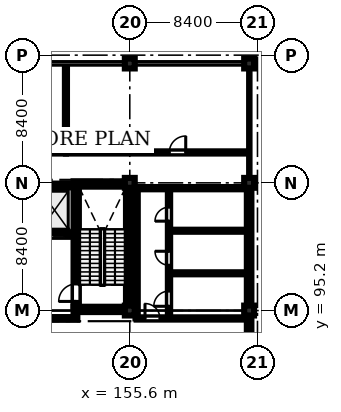
"""IFC4 building model, lengths in metres.
Left out: names, types, materials, properties, quantities, classifications, styles, units other than length and angle.
Written with IfcOpenShell. Run it as: python <this file> out.ifc"""

import sys

from ifc_helpers import new_model, si_unit, direction, frame, frame_2d, origin, origin_2d, place, context, subcontext, project, spatial, rectangle, extrude, element, fill, save


model = new_model("IFC4")
c1 = context("Model", 3, precision=1e-05, world=origin(), true_north=direction((0.0, 1.0)))
c2 = subcontext(c1, "Body", "Model", "MODEL_VIEW")
j1 = project(units=[si_unit("LENGTHUNIT", "METRE"), si_unit("PLANEANGLEUNIT", "RADIAN")], contexts=[c1])
p1 = place(None, origin())
s1 = spatial("IfcSite", under=j1, at=p1, CompositionType="ELEMENT")
p2 = place(p1, origin())
s2 = spatial("IfcBuilding", under=s1, at=p2, CompositionType="ELEMENT")
p3 = place(p2, frame((0.0, 0.0, 61.2)))
s3 = spatial("IfcBuildingStorey", under=s2, at=p3, CompositionType="ELEMENT", Elevation=61.2)
for number, where, z_axis, x_axis in (
    (1, (155.6, 95.2, 0.0), (0.0, 0.0, 1.0), (1.0, 0.0, 0.0)),
    (2, (155.6, 103.6, 0.0), (0.0, 0.0, 1.0), (1.0, 0.0, 0.0)),
    (3, (155.6, 111.45, 0.0), (0.0, 0.0, 1.0), (1.0, 0.0, 0.0)),
    (4, (163.45, 95.2, 0.0), (0.0, 0.0, 1.0), (1.0, 0.0, 0.0)),
    (5, (163.45, 103.6, 0.0), (0.0, 0.0, 1.0), (1.0, 0.0, 0.0)),
    (6, (163.45, 111.45, 0.0), (0.0, 0.0, 1.0), (1.0, 0.0, 0.0)),
):
    element("IfcColumn", number, at=place(p3, frame(where, z_axis=z_axis, x_axis=x_axis)), inside=s3, PredefinedType="COLUMN", context=c2, shape_type="SweptSolid", body=[
        extrude(rectangle(XDim=0.65, YDim=0.65, at=origin_2d()), origin(), (0.0, 0.0, 1.0), 4.28),
    ])
for number, where, z_axis, x_axis in (
    (7, (151.9, 95.275, 0.0), (0.0, 0.0, 1.0), (1.0, 0.0, 0.0)),
    (8, (151.9, 103.525, 0.0), (0.0, 0.0, 1.0), (1.0, 0.0, 0.0)),
):
    element("IfcWall", number, at=place(p3, frame(where, z_axis=z_axis, x_axis=x_axis)), inside=s3, PredefinedType="SHEAR", context=c2, shape_type="SweptSolid", body=[
        extrude(rectangle(XDim=3.8, YDim=0.35, at=frame_2d((1.9, 0.0))), origin(), (0.0, 0.0, 1.0), 4.28),
    ])
p4 = place(p3, frame((152.075, 95.45, 0.0), z_axis=(0.0, 0.0, 1.0), x_axis=(0.0, 1.0, 0.0)))
e9 = element("IfcWall", 9, at=p4, inside=s3, PredefinedType="SHEAR", context=c2, shape_type="SweptSolid", body=[
    extrude(rectangle(XDim=7.9, YDim=0.35, at=frame_2d((3.95, 0.0))), origin(), (0.0, 0.0, 1.0), 4.28),
])
p5 = place(p4, frame((0.35, 0.0, 0.0)))
e10 = element("IfcOpeningElement", 10, at=p5, cuts=e9, PredefinedType="OPENING", context=c2, shape_type="SweptSolid", body=[
    extrude(rectangle(XDim=1.15, YDim=2.15, at=frame_2d((0.575, 1.075))), frame((0.0, 0.185, 0.0), z_axis=(0.0, -1.0, 0.0), x_axis=(1.0, 0.0, 0.0)), (0.0, 0.0, 1.0), 0.37),
])
p6 = place(p3, frame((155.525, 95.45, 0.0), z_axis=(0.0, 0.0, 1.0), x_axis=(0.0, 1.0, 0.0)))
e11 = element("IfcWall", 11, at=p6, inside=s3, PredefinedType="SHEAR", context=c2, shape_type="SweptSolid", body=[
    extrude(rectangle(XDim=7.9, YDim=0.35, at=frame_2d((3.95, 0.0))), origin(), (0.0, 0.0, 1.0), 4.28),
])
p7 = place(p3, frame((149.45, 100.175, 0.0), z_axis=(0.0, 0.0, 1.0), x_axis=(1.0, 0.0, 0.0)))
e12 = element("IfcWall", 12, at=p7, inside=s3, PredefinedType="SHEAR", context=c2, shape_type="SweptSolid", body=[
    extrude(rectangle(XDim=2.45, YDim=0.25, at=frame_2d((1.225, 0.0))), origin(), (0.0, 0.0, 1.0), 4.28),
])
p8 = place(p7, frame((0.575, 0.0, 0.0)))
e13 = element("IfcOpeningElement", 13, at=p8, cuts=e12, PredefinedType="OPENING", context=c2, shape_type="SweptSolid", body=[
    extrude(rectangle(XDim=1.3, YDim=2.25, at=frame_2d((0.65, 1.125))), frame((0.0, 0.135, 0.0), z_axis=(0.0, -1.0, 0.0), x_axis=(1.0, 0.0, 0.0)), (0.0, 0.0, 1.0), 0.27),
])
p9 = place(p3, frame((149.45, 103.425, 0.0), z_axis=(0.0, 0.0, 1.0), x_axis=(1.0, 0.0, 0.0)))
e14 = element("IfcWall", 14, at=p9, inside=s3, PredefinedType="SHEAR", context=c2, shape_type="SweptSolid", body=[
    extrude(rectangle(XDim=2.45, YDim=0.25, at=frame_2d((1.225, 0.0))), origin(), (0.0, 0.0, 1.0), 4.28),
])
p10 = place(p3, frame((163.45, 94.875, 0.0), z_axis=(0.0, 0.0, 1.0), x_axis=(0.0, -1.0, 0.0)))
e15 = element("IfcWall", 15, at=p10, inside=s3, PredefinedType="STANDARD", context=c2, shape_type="SweptSolid", body=[
    extrude(rectangle(XDim=7.75, YDim=0.3, at=frame_2d((3.875, 0.0))), origin(), (0.0, 0.0, 1.0), 3.58),
])
p11 = place(p10, frame((4.2, 0.0, 1.1)))
e16 = element("IfcOpeningElement", 16, at=p11, cuts=e15, PredefinedType="OPENING", context=c2, shape_type="SweptSolid", body=[
    extrude(rectangle(XDim=1.8, YDim=1.8, at=frame_2d((0.9, 0.9))), frame((0.0, 0.16, 0.0), z_axis=(0.0, -1.0, 0.0), x_axis=(1.0, 0.0, 0.0)), (0.0, 0.0, 1.0), 0.32),
])
p12 = place(p3, frame((163.45, 103.275, 0.0), z_axis=(0.0, 0.0, 1.0), x_axis=(0.0, -1.0, 0.0)))
e17 = element("IfcWall", 17, at=p12, inside=s3, PredefinedType="STANDARD", context=c2, shape_type="SweptSolid", body=[
    extrude(rectangle(XDim=7.75, YDim=0.3, at=frame_2d((3.875, 0.0))), origin(), (0.0, 0.0, 1.0), 3.58),
])
p13 = place(p12, frame((1.15, 0.0, 1.1)))
e18 = element("IfcOpeningElement", 18, at=p13, cuts=e17, PredefinedType="OPENING", context=c2, shape_type="SweptSolid", body=[
    extrude(rectangle(XDim=1.4, YDim=1.4, at=frame_2d((0.7, 0.7))), frame((0.0, 0.16, 0.0), z_axis=(0.0, -1.0, 0.0), x_axis=(1.0, 0.0, 0.0)), (0.0, 0.0, 1.0), 0.32),
])
p14 = place(p3, frame((147.3, 94.68, 0.0), z_axis=(0.0, 0.0, 1.0), x_axis=(1.0, 0.0, 0.0)))
e19 = element("IfcWall", 19, at=p14, inside=s3, PredefinedType="STANDARD", context=c2, shape_type="SweptSolid", body=[
    extrude(rectangle(XDim=4.85, YDim=0.18, at=frame_2d((2.425, 0.0))), origin(), (0.0, 0.0, 1.0), 4.28),
])
p15 = place(p14, frame((1.6, 0.0, 0.0)))
e20 = element("IfcOpeningElement", 20, at=p15, cuts=e19, PredefinedType="OPENING", context=c2, shape_type="SweptSolid", body=[
    extrude(rectangle(XDim=1.15, YDim=2.15, at=frame_2d((0.575, 1.075))), frame((0.0, 0.1, 0.0), z_axis=(0.0, -1.0, 0.0), x_axis=(1.0, 0.0, 0.0)), (0.0, 0.0, 1.0), 0.2),
])
p16 = place(p3, frame((156.05, 94.68, 0.0), z_axis=(0.0, 0.0, 1.0), x_axis=(1.0, 0.0, 0.0)))
e21 = element("IfcWall", 21, at=p16, inside=s3, PredefinedType="PARTITIONING", context=c2, shape_type="SweptSolid", body=[
    extrude(rectangle(XDim=7.15, YDim=0.15, at=frame_2d((3.575, 0.0))), origin(), (0.0, 0.0, 1.0), 4.28),
])
p17 = place(p16, frame((0.55, 0.0, 0.0)))
e22 = element("IfcOpeningElement", 22, at=p17, cuts=e21, PredefinedType="OPENING", context=c2, shape_type="SweptSolid", body=[
    extrude(rectangle(XDim=0.98, YDim=2.12, at=frame_2d((0.49, 1.06))), frame((0.0, 0.085, 0.0), z_axis=(0.0, -1.0, 0.0), x_axis=(1.0, 0.0, 0.0)), (0.0, 0.0, 1.0), 0.17),
])
p18 = place(p3, frame((158.18, 94.68, 0.0), z_axis=(0.0, 0.0, 1.0), x_axis=(0.0, 1.0, 0.0)))
e23 = element("IfcWall", 23, at=p18, inside=s3, PredefinedType="PARTITIONING", context=c2, shape_type="SweptSolid", body=[
    extrude(rectangle(XDim=8.57, YDim=0.15, at=frame_2d((4.285, 0.0))), origin(), (0.0, 0.0, 1.0), 4.28),
])
p19 = place(p18, frame((0.8, 0.0, 0.0)))
e24 = element("IfcOpeningElement", 24, at=p19, cuts=e23, PredefinedType="OPENING", context=c2, shape_type="SweptSolid", body=[
    extrude(rectangle(XDim=1.0, YDim=2.12, at=frame_2d((0.5, 1.06))), frame((0.0, 0.085, 0.0), z_axis=(0.0, -1.0, 0.0), x_axis=(1.0, 0.0, 0.0)), (0.0, 0.0, 1.0), 0.17),
])
p20 = place(p18, frame((3.5, 0.0, 0.0)))
e25 = element("IfcOpeningElement", 25, at=p20, cuts=e23, PredefinedType="OPENING", context=c2, shape_type="SweptSolid", body=[
    extrude(rectangle(XDim=0.92, YDim=2.1, at=frame_2d((0.46, 1.05))), frame((0.0, 0.085, 0.0), z_axis=(0.0, -1.0, 0.0), x_axis=(1.0, 0.0, 0.0)), (0.0, 0.0, 1.0), 0.17),
])
p21 = place(p18, frame((6.4, 0.0, 0.0)))
e26 = element("IfcOpeningElement", 26, at=p21, cuts=e23, PredefinedType="OPENING", context=c2, shape_type="SweptSolid", body=[
    extrude(rectangle(XDim=0.92, YDim=2.1, at=frame_2d((0.46, 1.05))), frame((0.0, 0.085, 0.0), z_axis=(0.0, -1.0, 0.0), x_axis=(1.0, 0.0, 0.0)), (0.0, 0.0, 1.0), 0.17),
])
for number, where, z_axis, x_axis in (
    (27, (158.18, 97.65, 0.0), (0.0, 0.0, 1.0), (1.0, 0.0, 0.0)),
    (28, (158.18, 100.45, 0.0), (0.0, 0.0, 1.0), (1.0, 0.0, 0.0)),
):
    element("IfcWall", number, at=place(p3, frame(where, z_axis=z_axis, x_axis=x_axis)), inside=s3, PredefinedType="PARTITIONING", context=c2, shape_type="SweptSolid", body=[
        extrude(rectangle(XDim=5.02, YDim=0.135, at=frame_2d((2.51, 0.0))), origin(), (0.0, 0.0, 1.0), 4.28),
    ])
p22 = place(p3, frame((156.05, 103.25, 0.0), z_axis=(0.0, 0.0, 1.0), x_axis=(1.0, 0.0, 0.0)))
e29 = element("IfcWall", 29, at=p22, inside=s3, PredefinedType="PARTITIONING", context=c2, shape_type="SweptSolid", body=[
    extrude(rectangle(XDim=7.15, YDim=0.15, at=frame_2d((3.575, 0.0))), origin(), (0.0, 0.0, 1.0), 4.28),
])
p23 = place(p3, frame((156.05, 94.68, 0.0), z_axis=(0.0, 0.0, 1.0), x_axis=(0.0, 1.0, 0.0)))
e30 = element("IfcWall", 30, at=p23, inside=s3, PredefinedType="PARTITIONING", context=c2, shape_type="SweptSolid", body=[
    extrude(rectangle(XDim=8.57, YDim=0.15, at=frame_2d((4.285, 0.0))), origin(), (0.0, 0.0, 1.0), 4.28),
])
p24 = place(p3, frame((122.15, 105.6, 0.0), z_axis=(0.0, 0.0, 1.0), x_axis=(1.0, 0.0, 0.0)))
e31 = element("IfcWall", 31, at=p24, inside=s3, PredefinedType="PARTITIONING", context=c2, shape_type="SweptSolid", body=[
    extrude(rectangle(XDim=29.25, YDim=0.145, at=frame_2d((14.625, 0.0))), origin(), (0.0, 0.0, 1.0), 4.28),
])
p25 = place(p24, frame((3.75, 0.0, 0.0)))
e32 = element("IfcOpeningElement", 32, at=p25, cuts=e31, PredefinedType="OPENING", context=c2, shape_type="SweptSolid", body=[
    extrude(rectangle(XDim=1.92, YDim=2.28, at=frame_2d((0.96, 1.14))), frame((0.0, 0.083, 0.0), z_axis=(0.0, -1.0, 0.0), x_axis=(1.0, 0.0, 0.0)), (0.0, 0.0, 1.0), 0.165),
])
p26 = place(p3, frame((151.4, 105.6, 0.0), z_axis=(0.0, 0.0, 1.0), x_axis=(1.0, 0.0, 0.0)))
e33 = element("IfcWall", 33, at=p26, inside=s3, PredefinedType="PARTITIONING", context=c2, shape_type="SweptSolid", body=[
    extrude(rectangle(XDim=11.95, YDim=0.145, at=frame_2d((5.975, 0.0))), origin(), (0.0, 0.0, 1.0), 4.28),
])
p27 = place(p26, frame((6.8, 0.0, 0.0)))
e34 = element("IfcOpeningElement", 34, at=p27, cuts=e33, PredefinedType="OPENING", context=c2, shape_type="SweptSolid", body=[
    extrude(rectangle(XDim=1.08, YDim=2.15, at=frame_2d((0.54, 1.075))), frame((0.0, 0.083, 0.0), z_axis=(0.0, -1.0, 0.0), x_axis=(1.0, 0.0, 0.0)), (0.0, 0.0, 1.0), 0.165),
])
p28 = place(p3, frame((151.4, 105.6, 0.0), z_axis=(0.0, 0.0, 1.0), x_axis=(0.0, 1.0, 0.0)))
e35 = element("IfcWall", 35, at=p28, inside=s3, PredefinedType="PARTITIONING", context=c2, shape_type="SweptSolid", body=[
    extrude(rectangle(XDim=5.75, YDim=0.135, at=frame_2d((2.875, 0.0))), origin(), (0.0, 0.0, 1.0), 3.83),
])
p29 = place(p13, origin())
e36 = element("IfcWindow", 36, at=p29, inside=s3, PartitioningType="SINGLE_PANEL", PredefinedType="WINDOW", context=c2, shape_type="SweptSolid", body=[
    extrude(rectangle(XDim=1.4, YDim=1.4, at=frame_2d((0.7, 0.7))), frame((0.0, 0.03, 0.0), z_axis=(0.0, -1.0, 0.0), x_axis=(1.0, 0.0, 0.0)), (0.0, 0.0, 1.0), 0.06),
])
fill(e18, e36)
p30 = place(p17, origin())
e37 = element("IfcDoor", 37, at=p30, inside=s3, OperationType="SINGLE_SWING_LEFT", PredefinedType="DOOR", context=c2, shape_type="SweptSolid", body=[
    extrude(rectangle(XDim=0.98, YDim=2.12, at=frame_2d((0.49, 1.06))), frame((0.0, 0.025, 0.0), z_axis=(0.0, -1.0, 0.0), x_axis=(1.0, 0.0, 0.0)), (0.0, 0.0, 1.0), 0.05),
])
fill(e22, e37)
p31 = place(p19, origin())
e38 = element("IfcDoor", 38, at=p31, inside=s3, OperationType="SINGLE_SWING_LEFT", PredefinedType="DOOR", context=c2, shape_type="SweptSolid", body=[
    extrude(rectangle(XDim=1.0, YDim=2.12, at=frame_2d((0.5, 1.06))), frame((0.0, 0.025, 0.0), z_axis=(0.0, -1.0, 0.0), x_axis=(1.0, 0.0, 0.0)), (0.0, 0.0, 1.0), 0.05),
])
fill(e24, e38)
p32 = place(p20, origin())
e39 = element("IfcDoor", 39, at=p32, inside=s3, OperationType="SINGLE_SWING_RIGHT", PredefinedType="DOOR", context=c2, shape_type="SweptSolid", body=[
    extrude(rectangle(XDim=0.92, YDim=2.1, at=frame_2d((0.46, 1.05))), frame((0.0, 0.025, 0.0), z_axis=(0.0, -1.0, 0.0), x_axis=(1.0, 0.0, 0.0)), (0.0, 0.0, 1.0), 0.05),
])
fill(e25, e39)
p33 = place(p21, origin())
e40 = element("IfcDoor", 40, at=p33, inside=s3, OperationType="SINGLE_SWING_LEFT", PredefinedType="DOOR", context=c2, shape_type="SweptSolid", body=[
    extrude(rectangle(XDim=0.92, YDim=2.1, at=frame_2d((0.46, 1.05))), frame((0.0, 0.025, 0.0), z_axis=(0.0, -1.0, 0.0), x_axis=(1.0, 0.0, 0.0)), (0.0, 0.0, 1.0), 0.05),
])
fill(e26, e40)
p34 = place(p27, origin())
e41 = element("IfcDoor", 41, at=p34, inside=s3, OperationType="SINGLE_SWING_RIGHT", PredefinedType="DOOR", context=c2, shape_type="SweptSolid", body=[
    extrude(rectangle(XDim=1.08, YDim=2.15, at=frame_2d((0.54, 1.075))), frame((0.0, 0.025, 0.0), z_axis=(0.0, -1.0, 0.0), x_axis=(1.0, 0.0, 0.0)), (0.0, 0.0, 1.0), 0.05),
])
fill(e34, e41)
p35 = place(p5, origin())
e42 = element("IfcDoor", 42, at=p35, inside=s3, OperationType="SINGLE_SWING_LEFT", PredefinedType="DOOR", context=c2, shape_type="SweptSolid", body=[
    extrude(rectangle(XDim=1.15, YDim=2.15, at=frame_2d((0.575, 1.075))), frame((0.0, 0.025, 0.0), z_axis=(0.0, -1.0, 0.0), x_axis=(1.0, 0.0, 0.0)), (0.0, 0.0, 1.0), 0.05),
])
fill(e10, e42)
p36 = place(p8, origin())
e43 = element("IfcDoor", 43, at=p36, inside=s3, OperationType="SLIDING_TO_LEFT", PredefinedType="DOOR", context=c2, shape_type="SweptSolid", body=[
    extrude(rectangle(XDim=1.3, YDim=2.25, at=frame_2d((0.65, 1.125))), frame((0.0, 0.025, 0.0), z_axis=(0.0, -1.0, 0.0), x_axis=(1.0, 0.0, 0.0)), (0.0, 0.0, 1.0), 0.05),
])
fill(e13, e43)
save(model, sys.argv[1])
